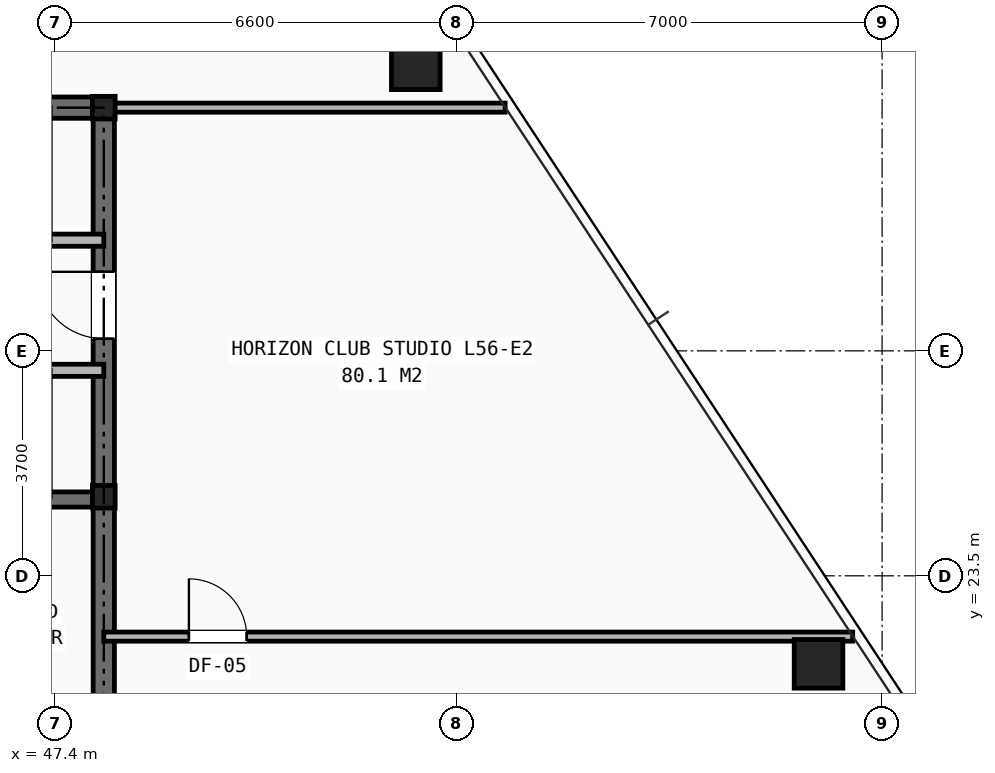
"""IFC4 building model, lengths in metres.
Left out: names, types, materials, properties, quantities, classifications, styles, units other than length and angle.
Written with IfcOpenShell. Run it as: python <this file> out.ifc"""

import sys

from ifc_helpers import new_model, si_unit, direction, frame, frame_2d, origin, origin_2d, place, context, subcontext, project, spatial, rectangle, hollow_rectangle, i_section, extrude, element, fill, save


model = new_model("IFC4")
c1 = context("Model", 3, precision=1e-05, world=origin(), true_north=direction((0.0, 1.0)))
c2 = subcontext(c1, "Body", "Model", "MODEL_VIEW")
j1 = project(units=[si_unit("LENGTHUNIT", "METRE"), si_unit("PLANEANGLEUNIT", "RADIAN")], contexts=[c1])
p1 = place(None, origin())
s1 = spatial("IfcSite", under=j1, at=p1, CompositionType="ELEMENT")
p2 = place(p1, origin())
s2 = spatial("IfcBuilding", under=s1, at=p2, CompositionType="ELEMENT")
p3 = place(p2, frame((0.0, 0.0, 196.5)))
s3 = spatial("IfcBuildingStorey", under=s2, at=p3, CompositionType="ELEMENT", Elevation=196.5)
for number, where, z_axis, x_axis in (
    (1, (48.2, 24.8, 0.0), (0.0, 0.0, 1.0), (1.0, 0.0, 0.0)),
    (2, (48.2, 31.2, 0.0), (0.0, 0.0, 1.0), (1.0, 0.0, 0.0)),
):
    element("IfcColumn", number, at=place(p3, frame(where, z_axis=z_axis, x_axis=x_axis)), inside=s3, PredefinedType="COLUMN", context=c2, shape_type="SweptSolid", body=[
        extrude(i_section(OverallWidth=0.374, OverallDepth=0.372, WebThickness=0.016, FlangeThickness=0.026, at=origin_2d()), origin(), (0.0, 0.0, 1.0), 4.2),
    ])
for number, where, z_axis, x_axis in (
    (3, (59.955, 22.052, 0.0), (0.0, 0.0, 1.0), (1.0, 0.0, 0.0)),
    (4, (53.331, 31.897, 0.0), (0.0, 0.0, 1.0), (1.0, 0.0, 0.0)),
):
    element("IfcColumn", number, at=place(p3, frame(where, z_axis=z_axis, x_axis=x_axis)), inside=s3, PredefinedType="COLUMN", context=c2, shape_type="SweptSolid", body=[
        extrude(hollow_rectangle(XDim=0.8, YDim=0.8, WallThickness=0.055, at=origin_2d()), origin(), (0.0, 0.0, 1.0), 4.2),
    ])
p4 = place(p3, frame((31.8, 31.2, 0.0), z_axis=(0.0, 0.0, 1.0), x_axis=(1.0, 0.0, 0.0)))
e5 = element("IfcWall", 5, at=p4, inside=s3, PredefinedType="SHEAR", context=c2, shape_type="SweptSolid", body=[
    extrude(rectangle(XDim=16.4, YDim=0.35, at=frame_2d((8.2, 0.0))), origin(), (0.0, 0.0, 1.0), 3.94),
])
p5 = place(p3, frame((48.2, 16.4, 0.0), z_axis=(0.0, 0.0, 1.0), x_axis=(0.0, 1.0, 0.0)))
e6 = element("IfcWall", 6, at=p5, inside=s3, PredefinedType="SHEAR", context=c2, shape_type="SweptSolid", body=[
    extrude(rectangle(XDim=14.8, YDim=0.35, at=frame_2d((7.4, 0.0))), origin(), (0.0, 0.0, 1.0), 3.94),
])
p6 = place(p5, frame((11.0, 0.0, 0.0)))
e7 = element("IfcOpeningElement", 7, at=p6, cuts=e6, PredefinedType="OPENING", context=c2, shape_type="SweptSolid", body=[
    extrude(rectangle(XDim=1.1, YDim=2.15, at=frame_2d((0.55, 1.075))), frame((0.0, 0.185, 0.0), z_axis=(0.0, -1.0, 0.0), x_axis=(1.0, 0.0, 0.0)), (0.0, 0.0, 1.0), 0.37),
])
p7 = place(p3, frame((44.955, 24.755, 0.0), z_axis=(0.0, 0.0, 1.0), x_axis=(1.0, 0.0, 0.0)))
e8 = element("IfcWall", 8, at=p7, inside=s3, PredefinedType="SHEAR", context=c2, shape_type="SweptSolid", body=[
    extrude(rectangle(XDim=3.245, YDim=0.25, at=frame_2d((1.623, 0.0))), origin(), (0.0, 0.0, 1.0), 3.94),
])
p8 = place(p3, frame((33.82, 29.02, 0.0), z_axis=(0.0, 0.0, 1.0), x_axis=(1.0, 0.0, 0.0)))
e9 = element("IfcWall", 9, at=p8, inside=s3, PredefinedType="SOLIDWALL", context=c2, shape_type="SweptSolid", body=[
    extrude(rectangle(XDim=14.38, YDim=0.2, at=frame_2d((7.19, 0.0))), origin(), (0.0, 0.0, 1.0), 3.395),
])
p9 = place(p8, frame((3.92, 0.0, 0.0)))
e10 = element("IfcOpeningElement", 10, at=p9, cuts=e9, PredefinedType="OPENING", context=c2, shape_type="SweptSolid", body=[
    extrude(rectangle(XDim=0.9, YDim=2.1, at=frame_2d((0.45, 1.05))), frame((0.0, 0.11, 0.0), z_axis=(0.0, -1.0, 0.0), x_axis=(1.0, 0.0, 0.0)), (0.0, 0.0, 1.0), 0.22),
])
p10 = place(p3, frame((33.82, 26.88, 0.0), z_axis=(0.0, 0.0, 1.0), x_axis=(1.0, 0.0, 0.0)))
e11 = element("IfcWall", 11, at=p10, inside=s3, PredefinedType="SOLIDWALL", context=c2, shape_type="SweptSolid", body=[
    extrude(rectangle(XDim=14.38, YDim=0.2, at=frame_2d((7.19, 0.0))), origin(), (0.0, 0.0, 1.0), 3.395),
])
p11 = place(p10, frame((0.53, 0.0, 0.0)))
e12 = element("IfcOpeningElement", 12, at=p11, cuts=e11, PredefinedType="OPENING", context=c2, shape_type="SweptSolid", body=[
    extrude(rectangle(XDim=1.1, YDim=2.15, at=frame_2d((0.55, 1.075))), frame((0.0, 0.11, 0.0), z_axis=(0.0, -1.0, 0.0), x_axis=(1.0, 0.0, 0.0)), (0.0, 0.0, 1.0), 0.22),
])
p12 = place(p10, frame((2.69, 0.0, 0.0)))
e13 = element("IfcOpeningElement", 13, at=p12, cuts=e11, PredefinedType="OPENING", context=c2, shape_type="SweptSolid", body=[
    extrude(rectangle(XDim=1.1, YDim=2.15, at=frame_2d((0.55, 1.075))), frame((0.0, 0.11, 0.0), z_axis=(0.0, -1.0, 0.0), x_axis=(1.0, 0.0, 0.0)), (0.0, 0.0, 1.0), 0.22),
])
p13 = place(p10, frame((4.85, 0.0, 0.0)))
e14 = element("IfcOpeningElement", 14, at=p13, cuts=e11, PredefinedType="OPENING", context=c2, shape_type="SweptSolid", body=[
    extrude(rectangle(XDim=1.1, YDim=2.15, at=frame_2d((0.55, 1.075))), frame((0.0, 0.11, 0.0), z_axis=(0.0, -1.0, 0.0), x_axis=(1.0, 0.0, 0.0)), (0.0, 0.0, 1.0), 0.22),
])
p14 = place(p10, frame((7.01, 0.0, 0.0)))
e15 = element("IfcOpeningElement", 15, at=p14, cuts=e11, PredefinedType="OPENING", context=c2, shape_type="SweptSolid", body=[
    extrude(rectangle(XDim=1.1, YDim=2.15, at=frame_2d((0.55, 1.075))), frame((0.0, 0.11, 0.0), z_axis=(0.0, -1.0, 0.0), x_axis=(1.0, 0.0, 0.0)), (0.0, 0.0, 1.0), 0.22),
])
p15 = place(p3, frame((48.2, 31.2, 0.0), z_axis=(0.0, 0.0, 1.0), x_axis=(1.0, 0.0, 0.0)))
e16 = element("IfcWall", 16, at=p15, inside=s3, PredefinedType="PARTITIONING", context=c2, shape_type="SweptSolid", body=[
    extrude(rectangle(XDim=6.601, YDim=0.15, at=frame_2d((3.3, 0.0))), origin(), (0.0, 0.0, 1.0), 2.955),
])
p16 = place(p3, frame((48.2, 22.5, 0.0), z_axis=(0.0, 0.0, 1.0), x_axis=(1.0, 0.0, 0.0)))
e17 = element("IfcWall", 17, at=p16, inside=s3, PredefinedType="PARTITIONING", context=c2, shape_type="SweptSolid", body=[
    extrude(rectangle(XDim=12.316, YDim=0.15, at=frame_2d((6.158, 0.0))), origin(), (0.0, 0.0, 1.0), 3.051),
])
p17 = place(p16, frame((1.4, 0.0, 0.0)))
e18 = element("IfcOpeningElement", 18, at=p17, cuts=e17, PredefinedType="OPENING", context=c2, shape_type="SweptSolid", body=[
    extrude(rectangle(XDim=0.95, YDim=2.1, at=frame_2d((0.475, 1.05))), frame((0.0, 0.085, 0.0), z_axis=(0.0, -1.0, 0.0), x_axis=(1.0, 0.0, 0.0)), (0.0, 0.0, 1.0), 0.17),
])
p18 = place(p6, origin())
e19 = element("IfcDoor", 19, at=p18, inside=s3, OperationType="SINGLE_SWING_RIGHT", PredefinedType="DOOR", context=c2, shape_type="SweptSolid", body=[
    extrude(rectangle(XDim=1.1, YDim=2.15, at=frame_2d((0.55, 1.075))), frame((0.0, 0.025, 0.0), z_axis=(0.0, -1.0, 0.0), x_axis=(1.0, 0.0, 0.0)), (0.0, 0.0, 1.0), 0.05),
])
fill(e7, e19)
p19 = place(p17, origin())
e20 = element("IfcDoor", 20, at=p19, inside=s3, OperationType="SINGLE_SWING_LEFT", PredefinedType="DOOR", context=c2, shape_type="SweptSolid", body=[
    extrude(rectangle(XDim=0.95, YDim=2.1, at=frame_2d((0.475, 1.05))), frame((0.0, 0.025, 0.0), z_axis=(0.0, -1.0, 0.0), x_axis=(1.0, 0.0, 0.0)), (0.0, 0.0, 1.0), 0.05),
])
fill(e18, e20)
save(model, sys.argv[1])
